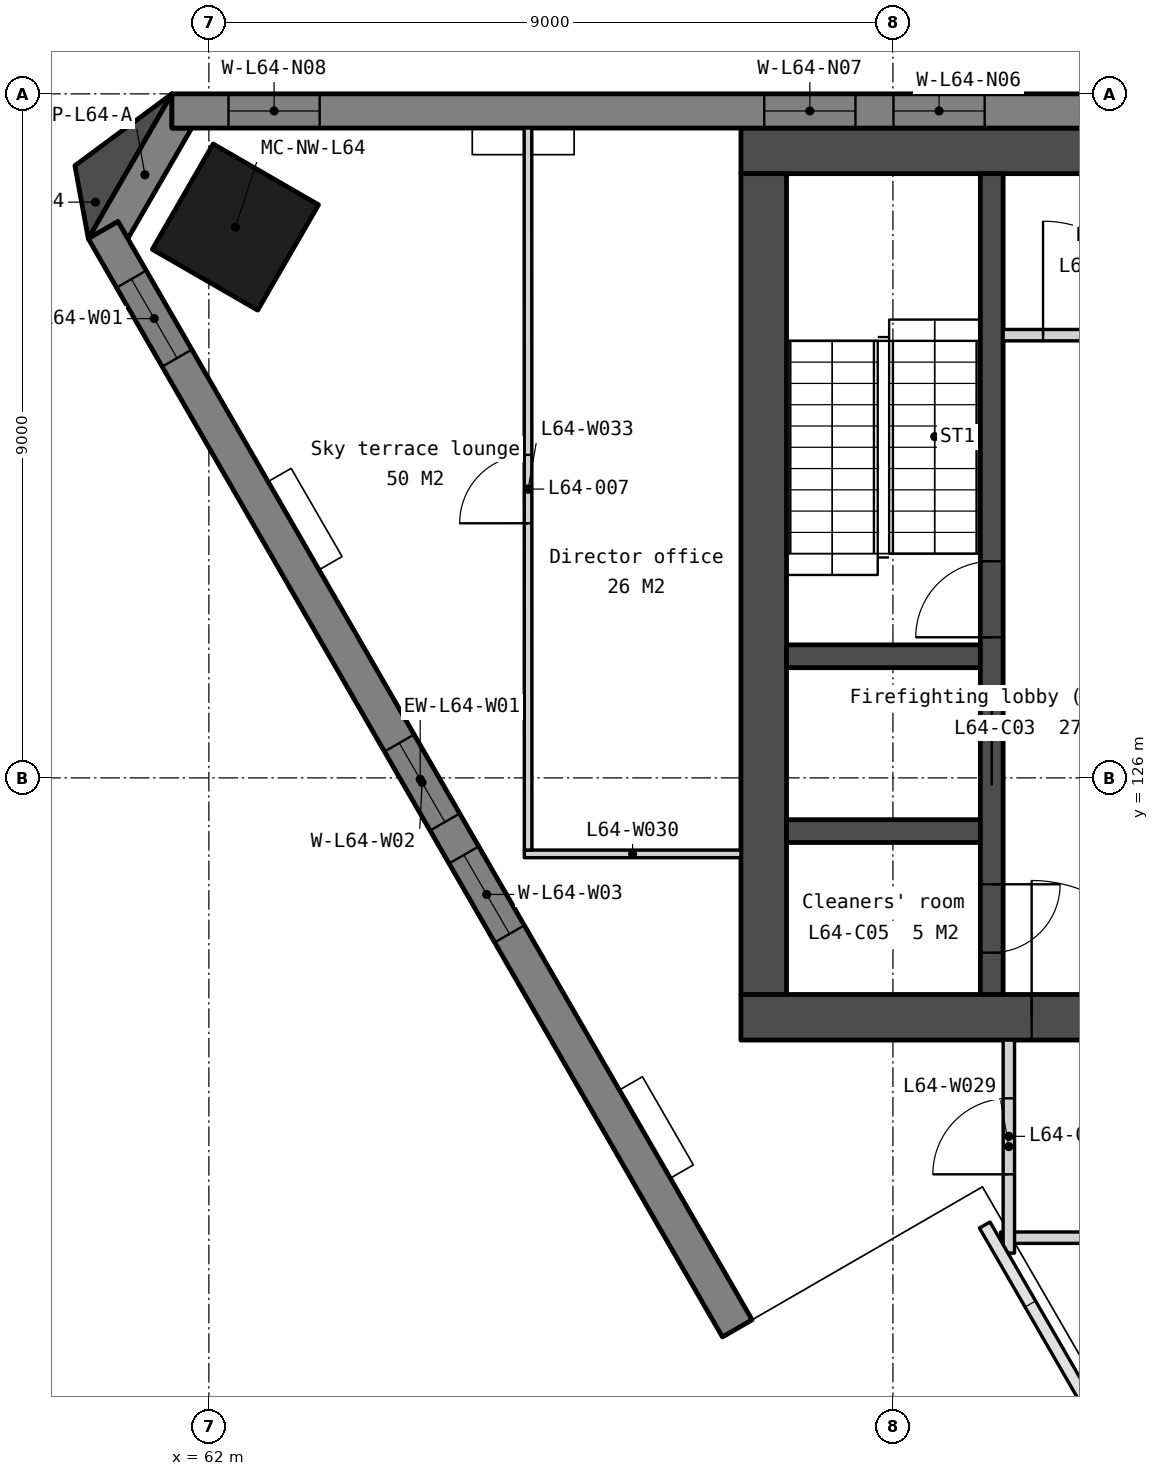
"""IFC4 building model, lengths in metres.
Left out: names, types, materials, properties, quantities, classifications, styles, units other than length and angle.
Written with IfcOpenShell. Run it as: python <this file> out.ifc"""

import sys

from ifc_helpers import new_model, si_unit, direction, frame, frame_2d, origin, origin_2d, place, context, subcontext, project, spatial, polyline, rectangle, outline, extrude, element, fill, save


model = new_model("IFC4")
c1 = context("Model", 3, precision=1e-05, world=origin(), true_north=direction((0.0, 1.0)))
c2 = subcontext(c1, "Body", "Model", "MODEL_VIEW")
j1 = project(units=[si_unit("LENGTHUNIT", "METRE"), si_unit("PLANEANGLEUNIT", "RADIAN")], contexts=[c1])
p1 = place(None, origin())
s1 = spatial("IfcSite", under=j1, at=p1, CompositionType="ELEMENT")
p2 = place(p1, origin())
s2 = spatial("IfcBuilding", under=s1, at=p2, CompositionType="ELEMENT")
p3 = place(p2, frame((0.0, 0.0, 262.1)))
s3 = spatial("IfcBuildingStorey", under=s2, at=p3, CompositionType="ELEMENT", Elevation=262.1)
p4 = place(p3, frame((62.349, 133.247, 0.0), z_axis=(0.0, 0.0, 1.0), x_axis=(-0.5, -0.866025403784, 0.0)))
e1 = element("IfcColumn", 1, at=p4, inside=s3, PredefinedType="COLUMN", context=c2, shape_type="SweptSolid", body=[
    extrude(rectangle(XDim=1.6, YDim=1.6, at=origin_2d()), origin(), (0.0, 0.0, 1.0), 3.9),
])
p5 = place(p3, frame((69.0, 134.25, 0.0), z_axis=(0.0, 0.0, 1.0), x_axis=(1.0, 0.0, 0.0)))
e2 = element("IfcWall", 2, at=p5, inside=s3, PredefinedType="SOLIDWALL", context=c2, shape_type="SweptSolid", body=[
    extrude(rectangle(XDim=22.0, YDim=0.6, at=frame_2d((11.0, 0.0))), origin(), (0.0, 0.0, 1.0), 3.75),
])
p6 = place(p3, frame((69.3, 133.95, 0.0), z_axis=(0.0, 0.0, 1.0), x_axis=(0.0, -1.0, 0.0)))
e3 = element("IfcWall", 3, at=p6, inside=s3, PredefinedType="SOLIDWALL", context=c2, shape_type="SweptSolid", body=[
    extrude(rectangle(XDim=10.8, YDim=0.6, at=frame_2d((5.4, 0.0))), origin(), (0.0, 0.0, 1.0), 3.75),
])
p7 = place(p3, frame((69.0, 122.85, 0.0), z_axis=(0.0, 0.0, 1.0), x_axis=(1.0, 0.0, 0.0)))
e4 = element("IfcWall", 4, at=p7, inside=s3, PredefinedType="SOLIDWALL", context=c2, shape_type="SweptSolid", body=[
    extrude(rectangle(XDim=22.0, YDim=0.6, at=frame_2d((11.0, 0.0))), origin(), (0.0, 0.0, 1.0), 3.75),
])
p8 = place(p7, frame((16.375, 0.0, 0.0)))
e5 = element("IfcOpeningElement", 5, at=p8, cuts=e4, PredefinedType="OPENING", context=c2, shape_type="SweptSolid", body=[
    extrude(rectangle(XDim=1.8, YDim=2.1, at=frame_2d((0.9, 1.05))), frame((0.0, 0.31, 0.0), z_axis=(0.0, -1.0, 0.0), x_axis=(1.0, 0.0, 0.0)), (0.0, 0.0, 1.0), 0.62),
])
p9 = place(p7, frame((3.825, 0.0, 0.0)))
e6 = element("IfcOpeningElement", 6, at=p9, cuts=e4, PredefinedType="OPENING", context=c2, shape_type="SweptSolid", body=[
    extrude(rectangle(XDim=1.8, YDim=2.1, at=frame_2d((0.9, 1.05))), frame((0.0, 0.31, 0.0), z_axis=(0.0, -1.0, 0.0), x_axis=(1.0, 0.0, 0.0)), (0.0, 0.0, 1.0), 0.62),
])
p10 = place(p7, frame((12.85, 0.0, 0.0)))
e7 = element("IfcOpeningElement", 7, at=p10, cuts=e4, PredefinedType="OPENING", context=c2, shape_type="SweptSolid", body=[
    extrude(rectangle(XDim=1.5, YDim=2.1, at=frame_2d((0.75, 1.05))), frame((0.0, 0.31, 0.0), z_axis=(0.0, -1.0, 0.0), x_axis=(1.0, 0.0, 0.0)), (0.0, 0.0, 1.0), 0.62),
])
for number, where, z_axis, x_axis in (
    (8, (69.6, 127.6, 0.0), (0.0, 0.0, 1.0), (1.0, 0.0, 0.0)),
    (9, (69.6, 125.3, 0.0), (0.0, 0.0, 1.0), (1.0, 0.0, 0.0)),
):
    element("IfcWall", number, at=place(p3, frame(where, z_axis=z_axis, x_axis=x_axis)), inside=s3, PredefinedType="SOLIDWALL", context=c2, shape_type="SweptSolid", body=[
        extrude(rectangle(XDim=2.55, YDim=0.3, at=frame_2d((1.275, 0.0))), origin(), (0.0, 0.0, 1.0), 3.75),
    ])
p11 = place(p3, frame((72.3, 133.95, 0.0), z_axis=(0.0, 0.0, 1.0), x_axis=(0.0, -1.0, 0.0)))
e10 = element("IfcWall", 10, at=p11, inside=s3, PredefinedType="SOLIDWALL", context=c2, shape_type="SweptSolid", body=[
    extrude(rectangle(XDim=10.8, YDim=0.3, at=frame_2d((5.4, 0.0))), origin(), (0.0, 0.0, 1.0), 3.75),
])
p12 = place(p11, frame((6.95, 0.0, 0.0)))
e11 = element("IfcOpeningElement", 11, at=p12, cuts=e10, PredefinedType="OPENING", context=c2, shape_type="SweptSolid", body=[
    extrude(rectangle(XDim=1.1, YDim=2.1, at=frame_2d((0.55, 1.05))), frame((0.0, 0.16, 0.0), z_axis=(0.0, -1.0, 0.0), x_axis=(1.0, 0.0, 0.0)), (0.0, 0.0, 1.0), 0.32),
])
p13 = place(p11, frame((9.35, 0.0, 0.0)))
e12 = element("IfcOpeningElement", 12, at=p13, cuts=e10, PredefinedType="OPENING", context=c2, shape_type="SweptSolid", body=[
    extrude(rectangle(XDim=0.9, YDim=2.1, at=frame_2d((0.45, 1.05))), frame((0.0, 0.16, 0.0), z_axis=(0.0, -1.0, 0.0), x_axis=(1.0, 0.0, 0.0)), (0.0, 0.0, 1.0), 0.32),
])
p14 = place(p11, frame((5.1, 0.0, 0.0)))
e13 = element("IfcOpeningElement", 13, at=p14, cuts=e10, PredefinedType="OPENING", context=c2, shape_type="SweptSolid", body=[
    extrude(rectangle(XDim=1.0, YDim=2.1, at=frame_2d((0.5, 1.05))), frame((0.0, 0.16, 0.0), z_axis=(0.0, -1.0, 0.0), x_axis=(1.0, 0.0, 0.0)), (0.0, 0.0, 1.0), 0.32),
])
p15 = place(p3, frame((72.45, 131.825, 0.0), z_axis=(0.0, 0.0, 1.0), x_axis=(1.0, 0.0, 0.0)))
e14 = element("IfcWall", 14, at=p15, inside=s3, PredefinedType="PARTITIONING", context=c2, shape_type="SweptSolid", body=[
    extrude(rectangle(XDim=3.45, YDim=0.15, at=frame_2d((1.725, 0.0))), origin(), (0.0, 0.0, 1.0), 3.75),
])
p16 = place(p15, frame((0.525, 0.0, 0.0)))
e15 = element("IfcOpeningElement", 15, at=p16, cuts=e14, PredefinedType="OPENING", context=c2, shape_type="SweptSolid", body=[
    extrude(rectangle(XDim=1.5, YDim=2.1, at=frame_2d((0.75, 1.05))), frame((0.0, 0.085, 0.0), z_axis=(0.0, -1.0, 0.0), x_axis=(1.0, 0.0, 0.0)), (0.0, 0.0, 1.0), 0.17),
])
p17 = place(p3, frame((0.0, 0.0, -0.15)))
e16 = element("IfcWall", 16, at=p17, inside=s3, PredefinedType="SOLIDWALL", context=c2, shape_type="SweptSolid", body=[
    extrude(outline(polyline([(61.514, 135.0), (61.514, 134.55), (61.774, 134.55), (60.933, 133.095), (60.803, 133.32), (60.414, 133.095), (61.514, 135.0)])), origin(), (0.0, 0.0, 1.0), 3.9),
])
p18 = place(p3, frame((98.486, 134.775, -0.15), z_axis=(0.0, 0.0, 1.0), x_axis=(-1.0, 0.0, 0.0)))
e17 = element("IfcWall", 17, at=p18, inside=s3, PredefinedType="SOLIDWALL", context=c2, shape_type="SweptSolid", body=[
    extrude(outline(polyline([(36.972, 0.0), (36.972, 3.9), (0.0, 3.9), (0.0, 0.0), (36.972, 0.0)])), frame((0.0, 0.225, 0.0), z_axis=(0.0, -1.0, 0.0), x_axis=(1.0, 0.0, 0.0)), (0.0, 0.0, 1.0), 0.45),
])
p19 = place(p18, frame((0.744, 0.0, 0.95)))
e18 = element("IfcOpeningElement", 18, at=p19, cuts=e17, PredefinedType="OPENING", context=c2, shape_type="SweptSolid", body=[
    extrude(rectangle(XDim=1.2, YDim=2.2, at=frame_2d((0.6, 1.1))), frame((0.0, 0.235, 0.0), z_axis=(0.0, -1.0, 0.0), x_axis=(1.0, 0.0, 0.0)), (0.0, 0.0, 1.0), 0.47),
])
p20 = place(p18, frame((7.793, 0.0, 0.95)))
e19 = element("IfcOpeningElement", 19, at=p20, cuts=e17, PredefinedType="OPENING", context=c2, shape_type="SweptSolid", body=[
    extrude(rectangle(XDim=1.2, YDim=2.2, at=frame_2d((0.6, 1.1))), frame((0.0, 0.235, 0.0), z_axis=(0.0, -1.0, 0.0), x_axis=(1.0, 0.0, 0.0)), (0.0, 0.0, 1.0), 0.47),
])
p21 = place(p18, frame((9.493, 0.0, 0.95)))
e20 = element("IfcOpeningElement", 20, at=p21, cuts=e17, PredefinedType="OPENING", context=c2, shape_type="SweptSolid", body=[
    extrude(rectangle(XDim=1.2, YDim=2.2, at=frame_2d((0.6, 1.1))), frame((0.0, 0.235, 0.0), z_axis=(0.0, -1.0, 0.0), x_axis=(1.0, 0.0, 0.0)), (0.0, 0.0, 1.0), 0.47),
])
p22 = place(p18, frame((17.036, 0.0, 0.95)))
e21 = element("IfcOpeningElement", 21, at=p22, cuts=e17, PredefinedType="OPENING", context=c2, shape_type="SweptSolid", body=[
    extrude(rectangle(XDim=1.2, YDim=2.2, at=frame_2d((0.6, 1.1))), frame((0.0, 0.235, 0.0), z_axis=(0.0, -1.0, 0.0), x_axis=(1.0, 0.0, 0.0)), (0.0, 0.0, 1.0), 0.47),
])
p23 = place(p18, frame((18.736, 0.0, 0.95)))
e22 = element("IfcOpeningElement", 22, at=p23, cuts=e17, PredefinedType="OPENING", context=c2, shape_type="SweptSolid", body=[
    extrude(rectangle(XDim=1.2, YDim=2.2, at=frame_2d((0.6, 1.1))), frame((0.0, 0.235, 0.0), z_axis=(0.0, -1.0, 0.0), x_axis=(1.0, 0.0, 0.0)), (0.0, 0.0, 1.0), 0.47),
])
p24 = place(p18, frame((26.279, 0.0, 0.95)))
e23 = element("IfcOpeningElement", 23, at=p24, cuts=e17, PredefinedType="OPENING", context=c2, shape_type="SweptSolid", body=[
    extrude(rectangle(XDim=1.2, YDim=2.2, at=frame_2d((0.6, 1.1))), frame((0.0, 0.235, 0.0), z_axis=(0.0, -1.0, 0.0), x_axis=(1.0, 0.0, 0.0)), (0.0, 0.0, 1.0), 0.47),
])
p25 = place(p18, frame((27.979, 0.0, 0.95)))
e24 = element("IfcOpeningElement", 24, at=p25, cuts=e17, PredefinedType="OPENING", context=c2, shape_type="SweptSolid", body=[
    extrude(rectangle(XDim=1.2, YDim=2.2, at=frame_2d((0.6, 1.1))), frame((0.0, 0.235, 0.0), z_axis=(0.0, -1.0, 0.0), x_axis=(1.0, 0.0, 0.0)), (0.0, 0.0, 1.0), 0.47),
])
p26 = place(p18, frame((35.028, 0.0, 0.95)))
e25 = element("IfcOpeningElement", 25, at=p26, cuts=e17, PredefinedType="OPENING", context=c2, shape_type="SweptSolid", body=[
    extrude(rectangle(XDim=1.2, YDim=2.2, at=frame_2d((0.6, 1.1))), frame((0.0, 0.235, 0.0), z_axis=(0.0, -1.0, 0.0), x_axis=(1.0, 0.0, 0.0)), (0.0, 0.0, 1.0), 0.47),
])
p27 = place(p3, frame((60.609, 133.207, -0.15), z_axis=(0.0, 0.0, 1.0), x_axis=(0.499996022837, -0.866027699989, 0.0)))
e26 = element("IfcWall", 26, at=p27, inside=s3, PredefinedType="SOLIDWALL", context=c2, shape_type="SweptSolid", body=[
    extrude(outline(polyline([(0.0, 0.0), (0.0, 3.9), (16.686, 3.9), (16.686, 0.0), (0.0, 0.0)])), frame((0.0, 0.225, 0.0), z_axis=(0.0, -1.0, 0.0), x_axis=(1.0, 0.0, 0.0)), (0.0, 0.0, 1.0), 0.45),
])
p28 = place(p27, frame((0.744, 0.0, 0.95)))
e27 = element("IfcOpeningElement", 27, at=p28, cuts=e26, PredefinedType="OPENING", context=c2, shape_type="SweptSolid", body=[
    extrude(rectangle(XDim=1.2, YDim=2.2, at=frame_2d((0.6, 1.1))), frame((0.0, 0.235, 0.0), z_axis=(0.0, -1.0, 0.0), x_axis=(1.0, 0.0, 0.0)), (0.0, 0.0, 1.0), 0.47),
])
p29 = place(p27, frame((7.793, 0.0, 0.95)))
e28 = element("IfcOpeningElement", 28, at=p29, cuts=e26, PredefinedType="OPENING", context=c2, shape_type="SweptSolid", body=[
    extrude(rectangle(XDim=1.2, YDim=2.2, at=frame_2d((0.6, 1.1))), frame((0.0, 0.235, 0.0), z_axis=(0.0, -1.0, 0.0), x_axis=(1.0, 0.0, 0.0)), (0.0, 0.0, 1.0), 0.47),
])
p30 = place(p27, frame((9.493, 0.0, 0.95)))
e29 = element("IfcOpeningElement", 29, at=p30, cuts=e26, PredefinedType="OPENING", context=c2, shape_type="SweptSolid", body=[
    extrude(rectangle(XDim=1.2, YDim=2.2, at=frame_2d((0.6, 1.1))), frame((0.0, 0.235, 0.0), z_axis=(0.0, -1.0, 0.0), x_axis=(1.0, 0.0, 0.0)), (0.0, 0.0, 1.0), 0.47),
])
p31 = place(p2, frame((0.0, 0.0, 258.2)))
s4 = spatial("IfcBuildingStorey", under=s2, at=p31, CompositionType="ELEMENT", Elevation=258.2)
for number, where, z_axis, x_axis in (
    (30, (68.869, 118.449, 0.0), (0.0, 0.0, 1.0), (0.866, 0.5, 0.0)),
    (31, (70.444, 115.721, 0.0), (0.0, 0.0, 1.0), (0.866, 0.5, 0.0)),
):
    element("IfcWall", number, at=place(p31, frame(where, z_axis=z_axis, x_axis=x_axis)), inside=s4, PredefinedType="SOLIDWALL", context=c2, shape_type="SweptSolid", body=[
        extrude(rectangle(XDim=3.95, YDim=0.45, at=frame_2d((1.975, 0.0))), origin(), (0.0, 0.0, 1.0), 7.65),
    ])
p32 = place(p3, frame((0.0, 0.0, -0.15)))
e32 = element("IfcWall", 32, at=p32, inside=s3, PredefinedType="SOLIDWALL", context=c2, shape_type="SweptSolid", body=[
    extrude(outline(polyline([(61.514, 135.0), (60.238, 134.055), (60.414, 133.095), (61.514, 135.0)])), origin(), (0.0, 0.0, 1.0), 3.9),
])
p33 = place(p3, frame((72.417, 119.95, 0.0), z_axis=(0.0, 0.0, 1.0), x_axis=(1.0, 0.0, 0.0)))
e33 = element("IfcWall", 33, at=p33, inside=s3, PredefinedType="PARTITIONING", context=c2, shape_type="SweptSolid", body=[
    extrude(rectangle(XDim=6.309, YDim=0.15, at=frame_2d((3.154, 0.0))), origin(), (0.0, 0.0, 1.0), 3.75),
])
p34 = place(p33, frame((2.728, 0.0, 0.0)))
e34 = element("IfcOpeningElement", 34, at=p34, cuts=e33, PredefinedType="OPENING", context=c2, shape_type="SweptSolid", body=[
    extrude(rectangle(XDim=1.0, YDim=2.1, at=frame_2d((0.5, 1.05))), frame((0.0, 0.085, 0.0), z_axis=(0.0, -1.0, 0.0), x_axis=(1.0, 0.0, 0.0)), (0.0, 0.0, 1.0), 0.17),
])
p35 = place(p3, frame((72.525, 119.748, 0.0), z_axis=(0.0, 0.0, 1.0), x_axis=(0.0, 1.0, 0.0)))
e35 = element("IfcWall", 35, at=p35, inside=s3, PredefinedType="PARTITIONING", context=c2, shape_type="SweptSolid", body=[
    extrude(rectangle(XDim=2.802, YDim=0.15, at=frame_2d((1.401, 0.0))), origin(), (0.0, 0.0, 1.0), 3.75),
])
p36 = place(p35, frame((1.036, 0.0, 0.0)))
e36 = element("IfcOpeningElement", 36, at=p36, cuts=e35, PredefinedType="OPENING", context=c2, shape_type="SweptSolid", body=[
    extrude(rectangle(XDim=1.0, YDim=2.1, at=frame_2d((0.5, 1.05))), frame((0.0, 0.085, 0.0), z_axis=(0.0, -1.0, 0.0), x_axis=(1.0, 0.0, 0.0)), (0.0, 0.0, 1.0), 0.17),
])
p37 = place(p3, frame((66.15, 125.0, 0.0), z_axis=(0.0, 0.0, 1.0), x_axis=(1.0, 0.0, 0.0)))
e37 = element("IfcWall", 37, at=p37, inside=s3, PredefinedType="PARTITIONING", context=c2, shape_type="SweptSolid", body=[
    extrude(rectangle(XDim=2.85, YDim=0.1, at=frame_2d((1.425, 0.0))), origin(), (0.0, 0.0, 1.0), 3.75),
])
p38 = place(p3, frame((66.2, 125.05, 0.0), z_axis=(0.0, 0.0, 1.0), x_axis=(-0.000205592101, 0.999999978866, 0.0)))
e38 = element("IfcWall", 38, at=p38, inside=s3, PredefinedType="PARTITIONING", context=c2, shape_type="SweptSolid", body=[
    extrude(rectangle(XDim=9.5, YDim=0.1, at=frame_2d((4.75, 0.0))), origin(), (0.0, 0.0, 1.0), 3.75),
])
p39 = place(p38, frame((4.3, 0.0, 0.0)))
e39 = element("IfcOpeningElement", 39, at=p39, cuts=e38, PredefinedType="OPENING", context=c2, shape_type="SweptSolid", body=[
    extrude(rectangle(XDim=0.9, YDim=2.1, at=frame_2d((0.45, 1.05))), frame((0.0, 0.06, 0.0), z_axis=(0.0, -1.0, 0.0), x_axis=(1.0, 0.0, 0.0)), (0.0, 0.0, 1.0), 0.12),
])
p40 = place(p12, origin())
e40 = element("IfcDoor", 40, at=p40, inside=s3, OperationType="SLIDING_TO_LEFT", PredefinedType="DOOR", context=c2, shape_type="SweptSolid", body=[
    extrude(rectangle(XDim=1.1, YDim=2.1, at=frame_2d((0.55, 1.05))), frame((0.0, 0.025, 0.0), z_axis=(0.0, -1.0, 0.0), x_axis=(1.0, 0.0, 0.0)), (0.0, 0.0, 1.0), 0.05),
])
fill(e11, e40)
p41 = place(p9, origin())
e41 = element("IfcDoor", 41, at=p41, inside=s3, OperationType="DOUBLE_DOOR_DOUBLE_SWING", PredefinedType="DOOR", context=c2, shape_type="SweptSolid", body=[
    extrude(rectangle(XDim=1.8, YDim=2.1, at=frame_2d((0.9, 1.05))), frame((0.0, 0.025, 0.0), z_axis=(0.0, -1.0, 0.0), x_axis=(1.0, 0.0, 0.0)), (0.0, 0.0, 1.0), 0.05),
])
fill(e6, e41)
p42 = place(p16, origin())
e42 = element("IfcDoor", 42, at=p42, inside=s3, OperationType="DOUBLE_DOOR_DOUBLE_SWING", PredefinedType="DOOR", context=c2, shape_type="SweptSolid", body=[
    extrude(rectangle(XDim=1.5, YDim=2.1, at=frame_2d((0.75, 1.05))), frame((0.0, 0.025, 0.0), z_axis=(0.0, -1.0, 0.0), x_axis=(1.0, 0.0, 0.0)), (0.0, 0.0, 1.0), 0.05),
])
fill(e15, e42)
p43 = place(p13, origin())
e43 = element("IfcDoor", 43, at=p43, inside=s3, OperationType="SINGLE_SWING_LEFT", PredefinedType="DOOR", context=c2, shape_type="SweptSolid", body=[
    extrude(rectangle(XDim=0.9, YDim=2.1, at=frame_2d((0.45, 1.05))), frame((0.0, 0.025, 0.0), z_axis=(0.0, -1.0, 0.0), x_axis=(1.0, 0.0, 0.0)), (0.0, 0.0, 1.0), 0.05),
])
fill(e12, e43)
p44 = place(p14, origin())
e44 = element("IfcDoor", 44, at=p44, inside=s3, OperationType="SINGLE_SWING_RIGHT", PredefinedType="DOOR", context=c2, shape_type="SweptSolid", body=[
    extrude(rectangle(XDim=1.0, YDim=2.1, at=frame_2d((0.5, 1.05))), frame((0.0, 0.025, 0.0), z_axis=(0.0, -1.0, 0.0), x_axis=(1.0, 0.0, 0.0)), (0.0, 0.0, 1.0), 0.05),
])
fill(e13, e44)
p45 = place(p24, origin())
e45 = element("IfcWindow", 45, at=p45, inside=s3, PartitioningType="SINGLE_PANEL", PredefinedType="WINDOW", context=c2, shape_type="SweptSolid", body=[
    extrude(rectangle(XDim=1.2, YDim=2.2, at=frame_2d((0.6, 1.1))), frame((0.0, 0.03, 0.0), z_axis=(0.0, -1.0, 0.0), x_axis=(1.0, 0.0, 0.0)), (0.0, 0.0, 1.0), 0.06),
])
fill(e23, e45)
p46 = place(p25, origin())
e46 = element("IfcWindow", 46, at=p46, inside=s3, PartitioningType="SINGLE_PANEL", PredefinedType="WINDOW", context=c2, shape_type="SweptSolid", body=[
    extrude(rectangle(XDim=1.2, YDim=2.2, at=frame_2d((0.6, 1.1))), frame((0.0, 0.03, 0.0), z_axis=(0.0, -1.0, 0.0), x_axis=(1.0, 0.0, 0.0)), (0.0, 0.0, 1.0), 0.06),
])
fill(e24, e46)
p47 = place(p26, origin())
e47 = element("IfcWindow", 47, at=p47, inside=s3, PartitioningType="SINGLE_PANEL", PredefinedType="WINDOW", context=c2, shape_type="SweptSolid", body=[
    extrude(rectangle(XDim=1.2, YDim=2.2, at=frame_2d((0.6, 1.1))), frame((0.0, 0.03, 0.0), z_axis=(0.0, -1.0, 0.0), x_axis=(1.0, 0.0, 0.0)), (0.0, 0.0, 1.0), 0.06),
])
fill(e25, e47)
p48 = place(p28, origin())
e48 = element("IfcWindow", 48, at=p48, inside=s3, PartitioningType="SINGLE_PANEL", PredefinedType="WINDOW", context=c2, shape_type="SweptSolid", body=[
    extrude(rectangle(XDim=1.2, YDim=2.2, at=frame_2d((0.6, 1.1))), frame((0.0, 0.03, 0.0), z_axis=(0.0, -1.0, 0.0), x_axis=(1.0, 0.0, 0.0)), (0.0, 0.0, 1.0), 0.06),
])
fill(e27, e48)
p49 = place(p29, origin())
e49 = element("IfcWindow", 49, at=p49, inside=s3, PartitioningType="SINGLE_PANEL", PredefinedType="WINDOW", context=c2, shape_type="SweptSolid", body=[
    extrude(rectangle(XDim=1.2, YDim=2.2, at=frame_2d((0.6, 1.1))), frame((0.0, 0.03, 0.0), z_axis=(0.0, -1.0, 0.0), x_axis=(1.0, 0.0, 0.0)), (0.0, 0.0, 1.0), 0.06),
])
fill(e28, e49)
p50 = place(p30, origin())
e50 = element("IfcWindow", 50, at=p50, inside=s3, PartitioningType="SINGLE_PANEL", PredefinedType="WINDOW", context=c2, shape_type="SweptSolid", body=[
    extrude(rectangle(XDim=1.2, YDim=2.2, at=frame_2d((0.6, 1.1))), frame((0.0, 0.03, 0.0), z_axis=(0.0, -1.0, 0.0), x_axis=(1.0, 0.0, 0.0)), (0.0, 0.0, 1.0), 0.06),
])
fill(e29, e50)
p51 = place(p39, origin())
e51 = element("IfcDoor", 51, at=p51, inside=s3, OperationType="SINGLE_SWING_LEFT", PredefinedType="DOOR", context=c2, shape_type="SweptSolid", body=[
    extrude(rectangle(XDim=0.9, YDim=2.1, at=frame_2d((0.45, 1.05))), frame((0.0, 0.025, 0.0), z_axis=(0.0, -1.0, 0.0), x_axis=(1.0, 0.0, 0.0)), (0.0, 0.0, 1.0), 0.05),
])
fill(e39, e51)
p52 = place(p36, origin())
e52 = element("IfcDoor", 52, at=p52, inside=s3, OperationType="SINGLE_SWING_LEFT", PredefinedType="DOOR", context=c2, shape_type="SweptSolid", body=[
    extrude(rectangle(XDim=1.0, YDim=2.1, at=frame_2d((0.5, 1.05))), frame((0.0, 0.025, 0.0), z_axis=(0.0, -1.0, 0.0), x_axis=(1.0, 0.0, 0.0)), (0.0, 0.0, 1.0), 0.05),
])
fill(e36, e52)
save(model, sys.argv[1])
